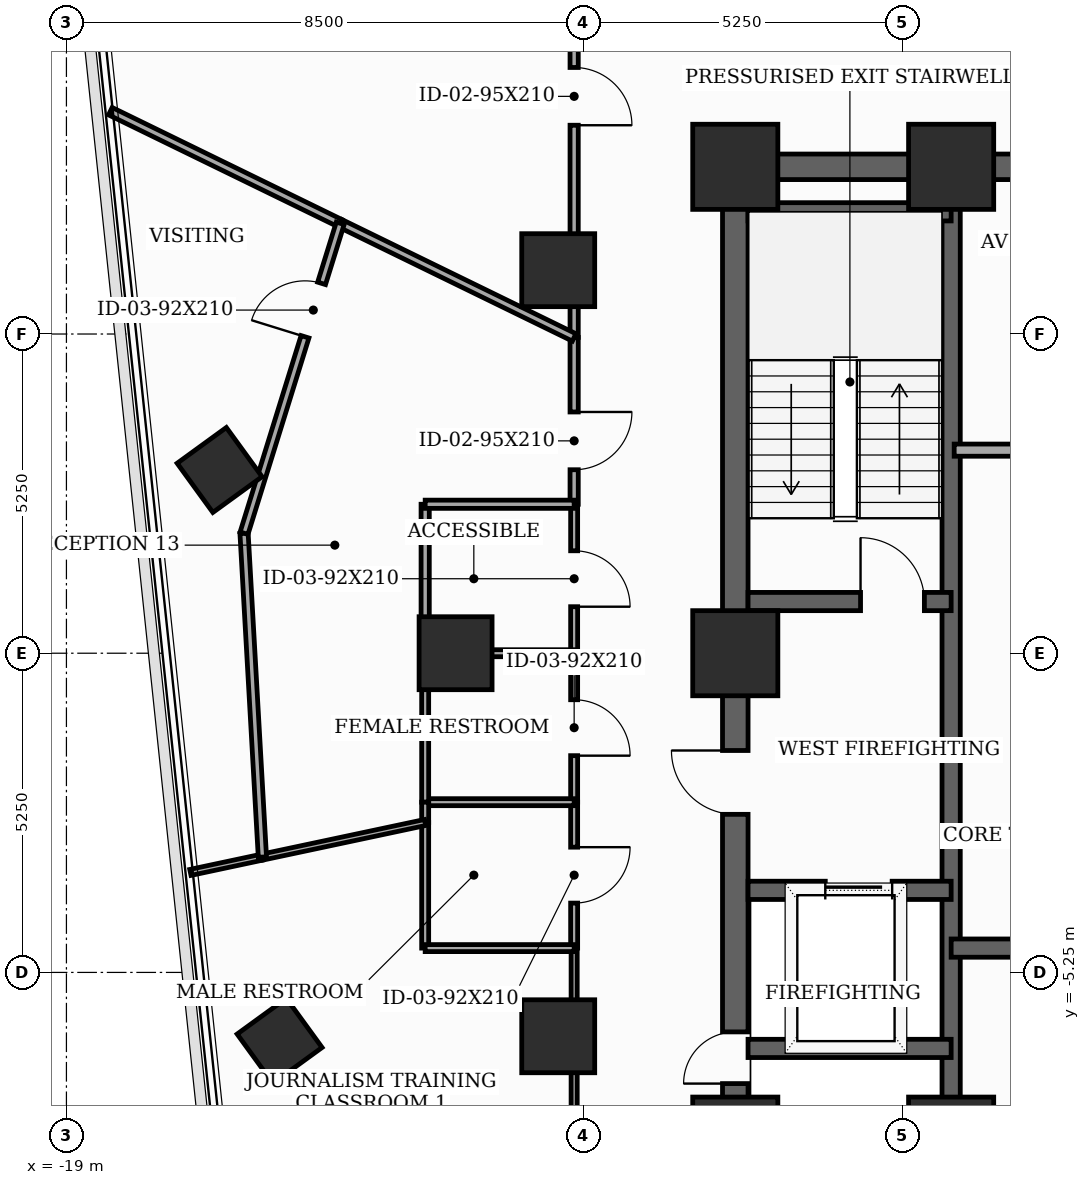
"""IFC4 building model, lengths in metres.
Left out: names, types, materials, properties, quantities, classifications, styles, units other than length and angle.
Written with IfcOpenShell. Run it as: python <this file> out.ifc"""

import sys

from ifc_helpers import new_model, si_unit, direction, frame, frame_2d, origin, origin_2d, place, context, subcontext, project, spatial, rectangle, extrude, element, fill, save


model = new_model("IFC4")
c1 = context("Model", 3, precision=1e-05, world=origin(), true_north=direction((0.0, 1.0)))
c2 = subcontext(c1, "Body", "Model", "MODEL_VIEW")
j1 = project(units=[si_unit("LENGTHUNIT", "METRE"), si_unit("PLANEANGLEUNIT", "RADIAN")], contexts=[c1])
p1 = place(None, origin())
s1 = spatial("IfcSite", under=j1, at=p1, CompositionType="ELEMENT")
p2 = place(p1, origin())
s2 = spatial("IfcBuilding", under=s1, at=p2, CompositionType="ELEMENT")
p3 = place(p2, frame((0.0, 0.0, 173.1)))
s3 = spatial("IfcBuildingStorey", under=s2, at=p3, CompositionType="ELEMENT", Elevation=173.1)
for number, where, z_axis, x_axis in (
    (1, (-8.0, -8.0, 0.0), (0.0, 0.0, 1.0), (1.0, 0.0, 0.0)),
    (2, (-4.45, -8.0, 0.0), (0.0, 0.0, 1.0), (1.0, 0.0, 0.0)),
    (3, (-4.45, 8.0, 0.0), (0.0, 0.0, 1.0), (1.0, 0.0, 0.0)),
    (4, (-8.0, 8.0, 0.0), (0.0, 0.0, 1.0), (1.0, 0.0, 0.0)),
    (5, (-8.0, 0.0, 0.0), (0.0, 0.0, 1.0), (1.0, 0.0, 0.0)),
):
    element("IfcColumn", number, at=place(p3, frame(where, z_axis=z_axis, x_axis=x_axis)), inside=s3, PredefinedType="COLUMN", context=c2, shape_type="SweptSolid", body=[
        extrude(rectangle(XDim=1.4, YDim=1.4, at=origin_2d()), origin(), (0.0, 0.0, 1.0), 3.7),
    ])
for number, where, z_axis, x_axis in (
    (6, (-10.912, 6.3, 0.0), (0.0, 0.0, 1.0), (1.0, 0.0, 0.0)),
    (7, (-12.6, 0.0, 0.0), (0.0, 0.0, 1.0), (1.0, 0.0, 0.0)),
    (8, (-10.912, -6.3, 0.0), (0.0, 0.0, 1.0), (1.0, 0.0, 0.0)),
):
    element("IfcColumn", number, at=place(p3, frame(where, z_axis=z_axis, x_axis=x_axis)), inside=s3, PredefinedType="COLUMN", context=c2, shape_type="SweptSolid", body=[
        extrude(rectangle(XDim=1.2, YDim=1.2, at=origin_2d()), origin(), (0.0, 0.0, 1.0), 3.7),
    ])
for number, where, z_axis, x_axis in (
    (9, (-16.481, 3.014, 0.0), (0.0, 0.0, 1.0), (0.809, 0.588, 0.0)),
    (10, (-15.494, -6.375, 0.0), (0.0, 0.0, 1.0), (0.809, 0.588, 0.0)),
):
    element("IfcColumn", number, at=place(p3, frame(where, z_axis=z_axis, x_axis=x_axis)), inside=s3, PredefinedType="COLUMN", context=c2, shape_type="SweptSolid", body=[
        extrude(rectangle(XDim=1.0, YDim=1.0, at=origin_2d()), origin(), (0.0, 0.0, 1.0), 3.7),
    ])
p4 = place(p3, frame((-8.0, -8.0, 0.0), z_axis=(0.0, 0.0, 1.0), x_axis=(0.0, 1.0, 0.0)))
e11 = element("IfcWall", 11, at=p4, inside=s3, PredefinedType="SHEAR", context=c2, shape_type="SweptSolid", body=[
    extrude(rectangle(XDim=16.0, YDim=0.42, at=frame_2d((8.0, 0.0))), origin(), (0.0, 0.0, 1.0), 3.5),
])
p5 = place(p4, frame((0.922, 0.0, 0.0)))
e12 = element("IfcOpeningElement", 12, at=p5, cuts=e11, PredefinedType="OPENING", context=c2, shape_type="SweptSolid", body=[
    extrude(rectangle(XDim=0.85, YDim=2.02, at=frame_2d((0.425, 1.01))), frame((0.0, 0.22, 0.0), z_axis=(0.0, -1.0, 0.0), x_axis=(1.0, 0.0, 0.0)), (0.0, 0.0, 1.0), 0.44),
])
p6 = place(p4, frame((5.35, 0.0, 0.0)))
e13 = element("IfcOpeningElement", 13, at=p6, cuts=e11, PredefinedType="OPENING", context=c2, shape_type="SweptSolid", body=[
    extrude(rectangle(XDim=1.05, YDim=2.15, at=frame_2d((0.525, 1.075))), frame((0.0, 0.22, 0.0), z_axis=(0.0, -1.0, 0.0), x_axis=(1.0, 0.0, 0.0)), (0.0, 0.0, 1.0), 0.44),
])
p7 = place(p3, frame((-8.0, 8.0, 0.0), z_axis=(0.0, 0.0, 1.0), x_axis=(1.0, 0.0, 0.0)))
e14 = element("IfcWall", 14, at=p7, inside=s3, PredefinedType="SHEAR", context=c2, shape_type="SweptSolid", body=[
    extrude(rectangle(XDim=16.0, YDim=0.42, at=frame_2d((8.0, 0.0))), origin(), (0.0, 0.0, 1.0), 3.5),
])
p8 = place(p7, frame((7.1, 0.0, 0.0)))
e15 = element("IfcOpeningElement", 15, at=p8, cuts=e14, PredefinedType="OPENING", context=c2, shape_type="SweptSolid", body=[
    extrude(rectangle(XDim=1.8, YDim=2.15, at=frame_2d((0.9, 1.075))), frame((0.0, 0.22, 0.0), z_axis=(0.0, -1.0, 0.0), x_axis=(1.0, 0.0, 0.0)), (0.0, 0.0, 1.0), 0.44),
])
p9 = place(p3, frame((-4.45, -7.79, 0.0), z_axis=(0.0, 0.0, 1.0), x_axis=(0.0, 1.0, 0.0)))
e16 = element("IfcWall", 16, at=p9, inside=s3, PredefinedType="SHEAR", context=c2, shape_type="SweptSolid", body=[
    extrude(rectangle(XDim=15.58, YDim=0.3, at=frame_2d((7.79, 0.0))), origin(), (0.0, 0.0, 1.0), 3.5),
])
p10 = place(p3, frame((-7.79, 0.85, 0.0), z_axis=(0.0, 0.0, 1.0), x_axis=(1.0, 0.0, 0.0)))
e17 = element("IfcWall", 17, at=p10, inside=s3, PredefinedType="SHEAR", context=c2, shape_type="SweptSolid", body=[
    extrude(rectangle(XDim=3.34, YDim=0.3, at=frame_2d((1.67, 0.0))), origin(), (0.0, 0.0, 1.0), 3.5),
])
p11 = place(p10, frame((1.85, 0.0, 0.0)))
e18 = element("IfcOpeningElement", 18, at=p11, cuts=e17, PredefinedType="OPENING", context=c2, shape_type="SweptSolid", body=[
    extrude(rectangle(XDim=1.05, YDim=2.15, at=frame_2d((0.525, 1.075))), frame((0.0, 0.16, 0.0), z_axis=(0.0, -1.0, 0.0), x_axis=(1.0, 0.0, 0.0)), (0.0, 0.0, 1.0), 0.32),
])
p12 = place(p3, frame((-7.79, 7.26, 0.0), z_axis=(0.0, 0.0, 1.0), x_axis=(1.0, 0.0, 0.0)))
e19 = element("IfcWall", 19, at=p12, inside=s3, PredefinedType="SHEAR", context=c2, shape_type="SweptSolid", body=[
    extrude(rectangle(XDim=3.34, YDim=0.3, at=frame_2d((1.67, 0.0))), origin(), (0.0, 0.0, 1.0), 3.5),
])
p13 = place(p3, frame((-7.79, -3.9, 0.0), z_axis=(0.0, 0.0, 1.0), x_axis=(1.0, 0.0, 0.0)))
e20 = element("IfcWall", 20, at=p13, inside=s3, PredefinedType="SHEAR", context=c2, shape_type="SweptSolid", body=[
    extrude(rectangle(XDim=3.34, YDim=0.3, at=frame_2d((1.67, 0.0))), origin(), (0.0, 0.0, 1.0), 3.5),
])
p14 = place(p13, frame((1.27, 0.0, 0.0)))
e21 = element("IfcOpeningElement", 21, at=p14, cuts=e20, PredefinedType="OPENING", context=c2, shape_type="SweptSolid", body=[
    extrude(rectangle(XDim=1.1, YDim=2.1, at=frame_2d((0.55, 1.05))), frame((0.0, 0.16, 0.0), z_axis=(0.0, -1.0, 0.0), x_axis=(1.0, 0.0, 0.0)), (0.0, 0.0, 1.0), 0.32),
])
p15 = place(p3, frame((-7.79, -6.5, 0.0), z_axis=(0.0, 0.0, 1.0), x_axis=(1.0, 0.0, 0.0)))
e22 = element("IfcWall", 22, at=p15, inside=s3, PredefinedType="SHEAR", context=c2, shape_type="SweptSolid", body=[
    extrude(rectangle(XDim=3.34, YDim=0.3, at=frame_2d((1.67, 0.0))), origin(), (0.0, 0.0, 1.0), 3.5),
])
p16 = place(p3, frame((-4.45, -4.85, 0.0), z_axis=(0.0, 0.0, 1.0), x_axis=(1.0, 0.0, 0.0)))
e23 = element("IfcWall", 23, at=p16, inside=s3, PredefinedType="SHEAR", context=c2, shape_type="SweptSolid", body=[
    extrude(rectangle(XDim=8.9, YDim=0.3, at=frame_2d((4.45, 0.0))), origin(), (0.0, 0.0, 1.0), 3.5),
])
p17 = place(p3, frame((-4.4, 3.34, 0.0), z_axis=(0.0, 0.0, 1.0), x_axis=(1.0, 0.0, 0.0)))
e24 = element("IfcWall", 24, at=p17, inside=s3, PredefinedType="SOLIDWALL", context=c2, shape_type="SweptSolid", body=[
    extrude(rectangle(XDim=2.68, YDim=0.2, at=frame_2d((1.34, 0.0))), origin(), (0.0, 0.0, 1.0), 3.5),
])
p18 = place(p3, frame((-10.65, 0.0, 0.0), z_axis=(0.0, 0.0, 1.0), x_axis=(0.0, -1.0, 0.0)))
e25 = element("IfcWall", 25, at=p18, inside=s3, PredefinedType="PARTITIONING", context=c2, shape_type="SweptSolid", body=[
    extrude(rectangle(XDim=2.45, YDim=0.115, at=frame_2d((1.225, 0.0))), origin(), (0.0, 0.0, 1.0), 2.885),
])
p19 = place(p18, frame((0.765, 0.0, 0.0)))
e26 = element("IfcOpeningElement", 26, at=p19, cuts=e25, PredefinedType="OPENING", context=c2, shape_type="SweptSolid", body=[
    extrude(rectangle(XDim=0.92, YDim=2.1, at=frame_2d((0.46, 1.05))), frame((0.0, 0.067, 0.0), z_axis=(0.0, -1.0, 0.0), x_axis=(1.0, 0.0, 0.0)), (0.0, 0.0, 1.0), 0.135),
])
p20 = place(p3, frame((-10.65, -2.45, 0.0), z_axis=(0.0, 0.0, 1.0), x_axis=(0.0, -1.0, 0.0)))
e27 = element("IfcWall", 27, at=p20, inside=s3, PredefinedType="PARTITIONING", context=c2, shape_type="SweptSolid", body=[
    extrude(rectangle(XDim=2.4, YDim=0.115, at=frame_2d((1.2, 0.0))), origin(), (0.0, 0.0, 1.0), 3.5),
])
p21 = place(p20, frame((0.74, 0.0, 0.0)))
e28 = element("IfcOpeningElement", 28, at=p21, cuts=e27, PredefinedType="OPENING", context=c2, shape_type="SweptSolid", body=[
    extrude(rectangle(XDim=0.92, YDim=2.1, at=frame_2d((0.46, 1.05))), frame((0.0, 0.067, 0.0), z_axis=(0.0, -1.0, 0.0), x_axis=(1.0, 0.0, 0.0)), (0.0, 0.0, 1.0), 0.135),
])
p22 = place(p3, frame((-10.65, -4.85, 0.0), z_axis=(0.0, 0.0, 1.0), x_axis=(0.0, -1.0, 0.0)))
e29 = element("IfcWall", 29, at=p22, inside=s3, PredefinedType="MOVABLE", context=c2, shape_type="SweptSolid", body=[
    extrude(rectangle(XDim=5.3, YDim=0.1, at=frame_2d((2.65, 0.0))), origin(), (0.0, 0.0, 1.0), 2.885),
])
p23 = place(p22, frame((3.78, 0.0, 0.0)))
e30 = element("IfcOpeningElement", 30, at=p23, cuts=e29, PredefinedType="OPENING", context=c2, shape_type="SweptSolid", body=[
    extrude(rectangle(XDim=0.92, YDim=2.1, at=frame_2d((0.46, 1.05))), frame((0.0, 0.06, 0.0), z_axis=(0.0, -1.0, 0.0), x_axis=(1.0, 0.0, 0.0)), (0.0, 0.0, 1.0), 0.12),
])
p24 = place(p3, frame((-10.65, 10.15, 0.0), z_axis=(0.0, 0.0, 1.0), x_axis=(0.0, -1.0, 0.0)))
e31 = element("IfcWall", 31, at=p24, inside=s3, PredefinedType="PARTITIONING", context=c2, shape_type="SweptSolid", body=[
    extrude(rectangle(XDim=4.956, YDim=0.135, at=frame_2d((2.478, 0.0))), origin(), (0.0, 0.0, 1.0), 2.885),
])
p25 = place(p24, frame((0.516, 0.0, 0.0)))
e32 = element("IfcOpeningElement", 32, at=p25, cuts=e31, PredefinedType="OPENING", context=c2, shape_type="SweptSolid", body=[
    extrude(rectangle(XDim=0.95, YDim=2.1, at=frame_2d((0.475, 1.05))), frame((0.0, 0.077, 0.0), z_axis=(0.0, -1.0, 0.0), x_axis=(1.0, 0.0, 0.0)), (0.0, 0.0, 1.0), 0.155),
])
p26 = place(p3, frame((-10.65, 5.194, 0.0), z_axis=(0.0, 0.0, 1.0), x_axis=(0.0, -1.0, 0.0)))
e33 = element("IfcWall", 33, at=p26, inside=s3, PredefinedType="PARTITIONING", context=c2, shape_type="SweptSolid", body=[
    extrude(rectangle(XDim=2.744, YDim=0.135, at=frame_2d((1.372, 0.0))), origin(), (0.0, 0.0, 1.0), 3.5),
])
p27 = place(p26, frame((1.226, 0.0, 0.0)))
e34 = element("IfcOpeningElement", 34, at=p27, cuts=e33, PredefinedType="OPENING", context=c2, shape_type="SweptSolid", body=[
    extrude(rectangle(XDim=0.95, YDim=2.1, at=frame_2d((0.475, 1.05))), frame((0.0, 0.077, 0.0), z_axis=(0.0, -1.0, 0.0), x_axis=(1.0, 0.0, 0.0)), (0.0, 0.0, 1.0), 0.155),
])
p28 = place(p3, frame((-10.65, 2.45, 0.0), z_axis=(0.0, 0.0, 1.0), x_axis=(0.0, -1.0, 0.0)))
e35 = element("IfcWall", 35, at=p28, inside=s3, PredefinedType="PARTITIONING", context=c2, shape_type="SweptSolid", body=[
    extrude(rectangle(XDim=2.45, YDim=0.115, at=frame_2d((1.225, 0.0))), origin(), (0.0, 0.0, 1.0), 2.885),
])
p29 = place(p28, frame((0.765, 0.0, 0.0)))
e36 = element("IfcOpeningElement", 36, at=p29, cuts=e35, PredefinedType="OPENING", context=c2, shape_type="SweptSolid", body=[
    extrude(rectangle(XDim=0.92, YDim=2.1, at=frame_2d((0.46, 1.05))), frame((0.0, 0.067, 0.0), z_axis=(0.0, -1.0, 0.0), x_axis=(1.0, 0.0, 0.0)), (0.0, 0.0, 1.0), 0.135),
])
p30 = place(p3, frame((-13.1, -2.45, 0.0), z_axis=(0.0, 0.0, 1.0), x_axis=(1.0, 0.0, 0.0)))
e37 = element("IfcWall", 37, at=p30, inside=s3, PredefinedType="PARTITIONING", context=c2, shape_type="SweptSolid", body=[
    extrude(rectangle(XDim=2.45, YDim=0.115, at=frame_2d((1.225, 0.0))), origin(), (0.0, 0.0, 1.0), 2.885),
])
p31 = place(p3, frame((-13.1, 0.0, 0.0), z_axis=(0.0, 0.0, 1.0), x_axis=(0.0, -1.0, 0.0)))
e38 = element("IfcWall", 38, at=p31, inside=s3, PredefinedType="PARTITIONING", context=c2, shape_type="SweptSolid", body=[
    extrude(rectangle(XDim=2.45, YDim=0.115, at=frame_2d((1.225, 0.0))), origin(), (0.0, 0.0, 1.0), 3.5),
])
p32 = place(p3, frame((-10.65, 0.0, 0.0), z_axis=(0.0, 0.0, 1.0), x_axis=(-1.0, 0.0, 0.0)))
e39 = element("IfcWall", 39, at=p32, inside=s3, PredefinedType="PARTITIONING", context=c2, shape_type="SweptSolid", body=[
    extrude(rectangle(XDim=2.45, YDim=0.115, at=frame_2d((1.225, 0.0))), origin(), (0.0, 0.0, 1.0), 2.885),
])
p33 = place(p3, frame((-13.1, -2.784, 0.0), z_axis=(0.0, 0.0, 1.0), x_axis=(0.0, -1.0, 0.0)))
e40 = element("IfcWall", 40, at=p33, inside=s3, PredefinedType="PARTITIONING", context=c2, shape_type="SweptSolid", body=[
    extrude(rectangle(XDim=2.066, YDim=0.115, at=frame_2d((1.033, 0.0))), origin(), (0.0, 0.0, 1.0), 3.5),
])
p34 = place(p3, frame((-13.1, -4.85, 0.0), z_axis=(0.0, 0.0, 1.0), x_axis=(1.0, 0.0, 0.0)))
e41 = element("IfcWall", 41, at=p34, inside=s3, PredefinedType="PARTITIONING", context=c2, shape_type="SweptSolid", body=[
    extrude(rectangle(XDim=2.45, YDim=0.115, at=frame_2d((1.225, 0.0))), origin(), (0.0, 0.0, 1.0), 2.885),
])
p35 = place(p3, frame((-13.1, -2.45, 0.0), z_axis=(0.0, 0.0, 1.0), x_axis=(0.0, -1.0, 0.0)))
e42 = element("IfcWall", 42, at=p35, inside=s3, PredefinedType="PARTITIONING", context=c2, shape_type="SweptSolid", body=[
    extrude(rectangle(XDim=0.334, YDim=0.115, at=frame_2d((0.167, 0.0))), origin(), (0.0, 0.0, 1.0), 3.5),
])
p36 = place(p3, frame((-15.777, -3.353, 0.0), z_axis=(0.0, 0.0, 1.0), x_axis=(-0.978029023755, -0.208468771503, 0.0)))
e43 = element("IfcWall", 43, at=p36, inside=s3, PredefinedType="MOVABLE", context=c2, shape_type="SweptSolid", body=[
    extrude(rectangle(XDim=1.211, YDim=0.1, at=frame_2d((0.605, 0.0))), origin(), (0.0, 0.0, 1.0), 2.985),
])
p37 = place(p3, frame((-13.1, -2.784, 0.0), z_axis=(0.0, 0.0, 1.0), x_axis=(-0.978141843994, -0.207938772307, 0.0)))
e44 = element("IfcWall", 44, at=p37, inside=s3, PredefinedType="MOVABLE", context=c2, shape_type="SweptSolid", body=[
    extrude(rectangle(XDim=2.737, YDim=0.1, at=frame_2d((1.368, 0.0))), origin(), (0.0, 0.0, 1.0), 2.985),
])
p38 = place(p3, frame((-18.277, 8.915, 0.0), z_axis=(0.0, 0.0, 1.0), x_axis=(0.898795221882, -0.43836873648, 0.0)))
e45 = element("IfcWall", 45, at=p38, inside=s3, PredefinedType="PARTITIONING", context=c2, shape_type="SweptSolid", body=[
    extrude(rectangle(XDim=4.206, YDim=0.135, at=frame_2d((2.103, 0.0))), origin(), (0.0, 0.0, 1.0), 2.985),
])
p39 = place(p3, frame((-14.497, 7.071, 0.0), z_axis=(0.0, 0.0, 1.0), x_axis=(0.89874213328, -0.438477568261, 0.0)))
e46 = element("IfcWall", 46, at=p39, inside=s3, PredefinedType="PARTITIONING", context=c2, shape_type="SweptSolid", body=[
    extrude(rectangle(XDim=4.281, YDim=0.135, at=frame_2d((2.14, 0.0))), origin(), (0.0, 0.0, 1.0), 2.885),
])
p40 = place(p3, frame((-15.777, -3.353, 0.0), z_axis=(0.0, 0.0, 1.0), x_axis=(-0.056600228811, 0.99839692212, 0.0)))
e47 = element("IfcWall", 47, at=p40, inside=s3, PredefinedType="PARTITIONING", context=c2, shape_type="SweptSolid", body=[
    extrude(rectangle(XDim=5.336, YDim=0.135, at=frame_2d((2.668, 0.0))), origin(), (0.0, 0.0, 1.0), 2.985),
])
p41 = place(p3, frame((-16.079, 1.974, 0.0), z_axis=(0.0, 0.0, 1.0), x_axis=(0.296438064518, 0.955052079158, 0.0)))
e48 = element("IfcWall", 48, at=p41, inside=s3, PredefinedType="PARTITIONING", context=c2, shape_type="SweptSolid", body=[
    extrude(rectangle(XDim=5.337, YDim=0.135, at=frame_2d((2.668, 0.0))), origin(), (0.0, 0.0, 1.0), 2.885),
])
p42 = place(p41, frame((3.383, 0.0, 0.0)))
e49 = element("IfcOpeningElement", 49, at=p42, cuts=e48, PredefinedType="OPENING", context=c2, shape_type="SweptSolid", body=[
    extrude(rectangle(XDim=0.92, YDim=2.1, at=frame_2d((0.46, 1.05))), frame((0.0, 0.077, 0.0), z_axis=(0.0, -1.0, 0.0), x_axis=(1.0, 0.0, 0.0)), (0.0, 0.0, 1.0), 0.155),
])
p43 = place(p3, frame((-13.1, 0.0, 0.0), z_axis=(0.0, 0.0, 1.0), x_axis=(0.0, 1.0, 0.0)))
e50 = element("IfcWall", 50, at=p43, inside=s3, PredefinedType="PARTITIONING", context=c2, shape_type="SweptSolid", body=[
    extrude(rectangle(XDim=2.45, YDim=0.135, at=frame_2d((1.225, 0.0))), origin(), (0.0, 0.0, 1.0), 2.885),
])
p44 = place(p3, frame((-13.1, 2.45, 0.0), z_axis=(0.0, 0.0, 1.0), x_axis=(1.0, 0.0, 0.0)))
e51 = element("IfcWall", 51, at=p44, inside=s3, PredefinedType="PARTITIONING", context=c2, shape_type="SweptSolid", body=[
    extrude(rectangle(XDim=2.45, YDim=0.135, at=frame_2d((1.225, 0.0))), origin(), (0.0, 0.0, 1.0), 2.885),
])
p45 = place(p5, origin())
e52 = element("IfcDoor", 52, at=p45, inside=s3, OperationType="SINGLE_SWING_LEFT", PredefinedType="TRAPDOOR", context=c2, shape_type="SweptSolid", body=[
    extrude(rectangle(XDim=0.85, YDim=2.02, at=frame_2d((0.425, 1.01))), frame((0.0, 0.025, 0.0), z_axis=(0.0, -1.0, 0.0), x_axis=(1.0, 0.0, 0.0)), (0.0, 0.0, 1.0), 0.05),
])
fill(e12, e52)
p46 = place(p6, origin())
e53 = element("IfcDoor", 53, at=p46, inside=s3, OperationType="SINGLE_SWING_RIGHT", PredefinedType="DOOR", context=c2, shape_type="SweptSolid", body=[
    extrude(rectangle(XDim=1.05, YDim=2.15, at=frame_2d((0.525, 1.075))), frame((0.0, 0.025, 0.0), z_axis=(0.0, -1.0, 0.0), x_axis=(1.0, 0.0, 0.0)), (0.0, 0.0, 1.0), 0.05),
])
fill(e13, e53)
p47 = place(p11, origin())
e54 = element("IfcDoor", 54, at=p47, inside=s3, OperationType="SINGLE_SWING_LEFT", PredefinedType="DOOR", context=c2, shape_type="SweptSolid", body=[
    extrude(rectangle(XDim=1.05, YDim=2.15, at=frame_2d((0.525, 1.075))), frame((0.0, 0.025, 0.0), z_axis=(0.0, -1.0, 0.0), x_axis=(1.0, 0.0, 0.0)), (0.0, 0.0, 1.0), 0.05),
])
fill(e18, e54)
p48 = place(p14, origin())
e55 = element("IfcDoor", 55, at=p48, inside=s3, OperationType="SLIDING_TO_LEFT", PredefinedType="DOOR", context=c2, shape_type="SweptSolid", body=[
    extrude(rectangle(XDim=1.1, YDim=2.1, at=frame_2d((0.55, 1.05))), frame((0.0, 0.025, 0.0), z_axis=(0.0, -1.0, 0.0), x_axis=(1.0, 0.0, 0.0)), (0.0, 0.0, 1.0), 0.05),
])
fill(e21, e55)
p49 = place(p19, origin())
e56 = element("IfcDoor", 56, at=p49, inside=s3, OperationType="SINGLE_SWING_RIGHT", PredefinedType="DOOR", context=c2, shape_type="SweptSolid", body=[
    extrude(rectangle(XDim=0.92, YDim=2.1, at=frame_2d((0.46, 1.05))), frame((0.0, 0.025, 0.0), z_axis=(0.0, -1.0, 0.0), x_axis=(1.0, 0.0, 0.0)), (0.0, 0.0, 1.0), 0.05),
])
fill(e26, e56)
p50 = place(p21, origin())
e57 = element("IfcDoor", 57, at=p50, inside=s3, OperationType="SINGLE_SWING_LEFT", PredefinedType="DOOR", context=c2, shape_type="SweptSolid", body=[
    extrude(rectangle(XDim=0.92, YDim=2.1, at=frame_2d((0.46, 1.05))), frame((0.0, 0.025, 0.0), z_axis=(0.0, -1.0, 0.0), x_axis=(1.0, 0.0, 0.0)), (0.0, 0.0, 1.0), 0.05),
])
fill(e28, e57)
p51 = place(p25, origin())
e58 = element("IfcDoor", 58, at=p51, inside=s3, OperationType="SINGLE_SWING_RIGHT", PredefinedType="DOOR", context=c2, shape_type="SweptSolid", body=[
    extrude(rectangle(XDim=0.95, YDim=2.1, at=frame_2d((0.475, 1.05))), frame((0.0, 0.025, 0.0), z_axis=(0.0, -1.0, 0.0), x_axis=(1.0, 0.0, 0.0)), (0.0, 0.0, 1.0), 0.05),
])
fill(e32, e58)
p52 = place(p27, origin())
e59 = element("IfcDoor", 59, at=p52, inside=s3, OperationType="SINGLE_SWING_LEFT", PredefinedType="DOOR", context=c2, shape_type="SweptSolid", body=[
    extrude(rectangle(XDim=0.95, YDim=2.1, at=frame_2d((0.475, 1.05))), frame((0.0, 0.025, 0.0), z_axis=(0.0, -1.0, 0.0), x_axis=(1.0, 0.0, 0.0)), (0.0, 0.0, 1.0), 0.05),
])
fill(e34, e59)
p53 = place(p29, origin())
e60 = element("IfcDoor", 60, at=p53, inside=s3, OperationType="SINGLE_SWING_RIGHT", PredefinedType="DOOR", context=c2, shape_type="SweptSolid", body=[
    extrude(rectangle(XDim=0.92, YDim=2.1, at=frame_2d((0.46, 1.05))), frame((0.0, 0.025, 0.0), z_axis=(0.0, -1.0, 0.0), x_axis=(1.0, 0.0, 0.0)), (0.0, 0.0, 1.0), 0.05),
])
fill(e36, e60)
p54 = place(p42, origin())
e61 = element("IfcDoor", 61, at=p54, inside=s3, OperationType="SINGLE_SWING_LEFT", PredefinedType="DOOR", context=c2, shape_type="SweptSolid", body=[
    extrude(rectangle(XDim=0.92, YDim=2.1, at=frame_2d((0.46, 1.05))), frame((0.0, 0.025, 0.0), z_axis=(0.0, -1.0, 0.0), x_axis=(1.0, 0.0, 0.0)), (0.0, 0.0, 1.0), 0.05),
])
fill(e49, e61)
save(model, sys.argv[1])
